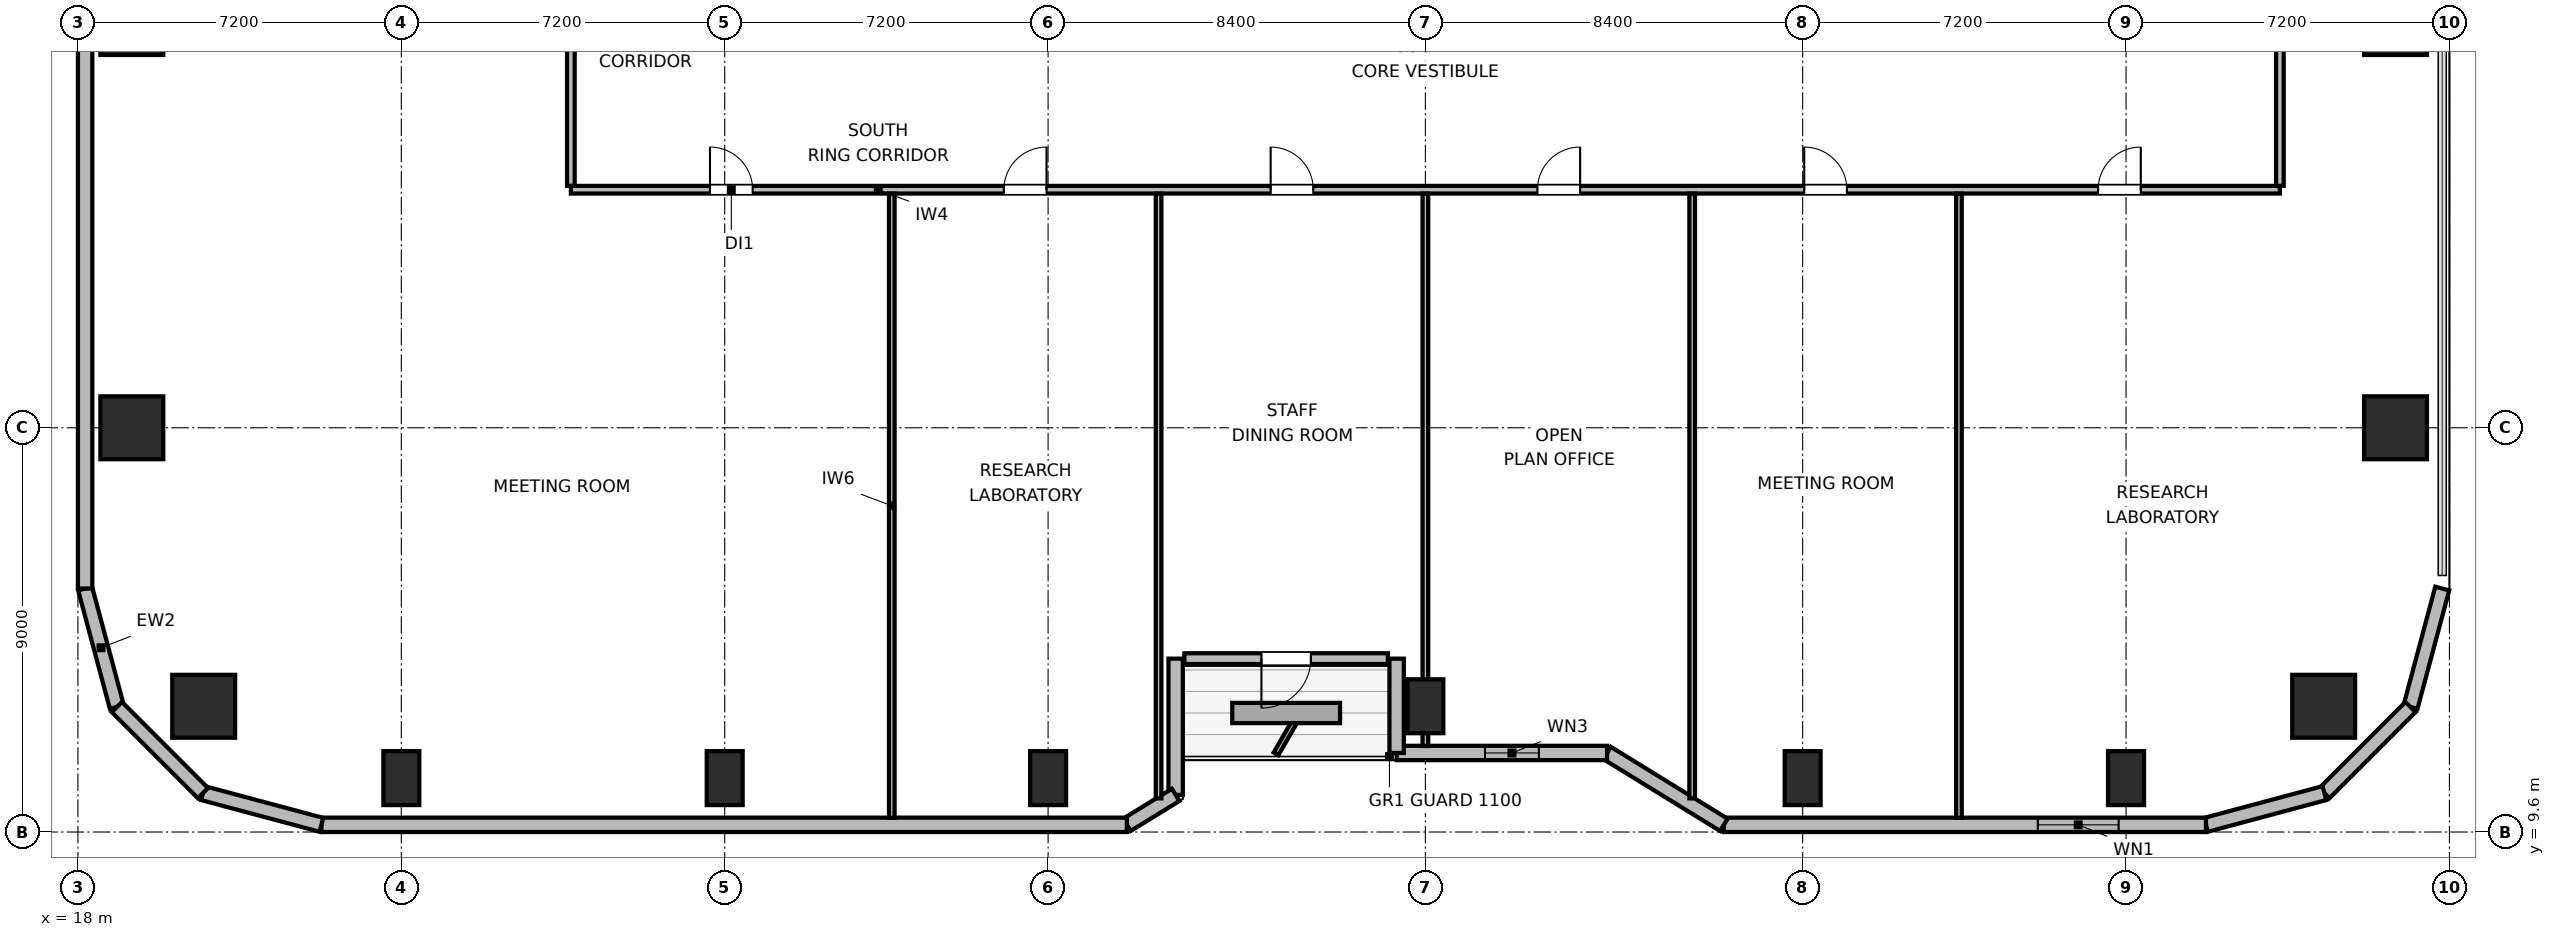
"""IFC4 building model, lengths in metres.
Left out: names, types, materials, properties, quantities, classifications, styles, units other than length and angle.
Written with IfcOpenShell. Run it as: python <this file> out.ifc"""

import sys

from ifc_helpers import new_model, si_unit, direction, frame, frame_2d, origin, origin_2d, place, context, subcontext, project, spatial, rectangle, circle, extrude, element, fill, save


model = new_model("IFC4")
c1 = context("Model", 3, precision=1e-05, world=origin(), true_north=direction((0.0, 1.0)))
c2 = subcontext(c1, "Body", "Model", "MODEL_VIEW")
j1 = project(units=[si_unit("LENGTHUNIT", "METRE"), si_unit("PLANEANGLEUNIT", "RADIAN")], contexts=[c1])
p1 = place(None, origin())
s1 = spatial("IfcSite", under=j1, at=p1, CompositionType="ELEMENT")
p2 = place(p1, origin())
s2 = spatial("IfcBuilding", under=s1, at=p2, CompositionType="ELEMENT")
p3 = place(p2, frame((0.0, 0.0, 101.4)))
s3 = spatial("IfcBuildingStorey", under=s2, at=p3, CompositionType="ELEMENT", Elevation=101.4)
for number, where, z_axis, x_axis in (
    (1, (20.8, 12.4, 0.0), (0.0, 0.0, 1.0), (1.0, 0.0, 0.0)),
    (2, (68.0, 12.4, 0.0), (0.0, 0.0, 1.0), (1.0, 0.0, 0.0)),
):
    element("IfcColumn", number, at=place(p3, frame(where, z_axis=z_axis, x_axis=x_axis)), inside=s3, PredefinedType="COLUMN", context=c2, shape_type="SweptSolid", body=[
        extrude(circle(Radius=0.7, at=origin_2d()), origin(), (0.0, 0.0, 1.0), 3.9),
    ])
for number, where, z_axis, x_axis in (
    (3, (25.2, 10.8, 0.0), (0.0, 0.0, 1.0), (1.0, 0.0, 0.0)),
    (4, (32.4, 10.8, 0.0), (0.0, 0.0, 1.0), (1.0, 0.0, 0.0)),
    (5, (39.6, 10.8, 0.0), (0.0, 0.0, 1.0), (1.0, 0.0, 0.0)),
    (6, (48.0, 12.4, 0.0), (0.0, 0.0, 1.0), (1.0, 0.0, 0.0)),
    (7, (56.4, 10.8, 0.0), (0.0, 0.0, 1.0), (1.0, 0.0, 0.0)),
    (8, (63.6, 10.8, 0.0), (0.0, 0.0, 1.0), (1.0, 0.0, 0.0)),
):
    element("IfcColumn", number, at=place(p3, frame(where, z_axis=z_axis, x_axis=x_axis)), inside=s3, PredefinedType="COLUMN", context=c2, shape_type="SweptSolid", body=[
        extrude(rectangle(XDim=0.8, YDim=1.2, at=origin_2d()), origin(), (0.0, 0.0, 1.0), 3.9),
    ])
for number, where, z_axis, x_axis in (
    (9, (19.2, 18.6, 0.0), (0.0, 0.0, 1.0), (1.0, 0.0, 0.0)),
    (10, (69.6, 18.6, 0.0), (0.0, 0.0, 1.0), (1.0, 0.0, 0.0)),
    (11, (19.2, 27.6, 0.0), (0.0, 0.0, 1.0), (1.0, 0.0, 0.0)),
    (12, (69.6, 27.6, 0.0), (0.0, 0.0, 1.0), (1.0, 0.0, 0.0)),
):
    element("IfcColumn", number, at=place(p3, frame(where, z_axis=z_axis, x_axis=x_axis)), inside=s3, PredefinedType="COLUMN", context=c2, shape_type="SweptSolid", body=[
        extrude(rectangle(XDim=1.4, YDim=1.4, at=origin_2d()), origin(), (0.0, 0.0, 1.0), 3.9),
    ])
p4 = place(p3, frame((18.866, 12.383, 0.0), z_axis=(0.0, 0.0, 1.0), x_axis=(-0.25869736047, 0.965958423373, 0.0)))
e13 = element("IfcWall", 13, at=p4, inside=s3, PredefinedType="SOLIDWALL", context=c2, shape_type="SweptSolid", body=[
    extrude(rectangle(XDim=2.731, YDim=0.32, at=frame_2d((1.366, 0.0))), origin(), (0.0, 0.0, 1.0), 3.64),
])
p5 = place(p3, frame((18.16, 15.021, 0.0), z_axis=(0.0, 0.0, 1.0), x_axis=(0.0, 1.0, 0.0)))
e14 = element("IfcWall", 14, at=p5, inside=s3, PredefinedType="SOLIDWALL", context=c2, shape_type="SweptSolid", body=[
    extrude(rectangle(XDim=14.219, YDim=0.32, at=frame_2d((7.109, 0.0))), origin(), (0.0, 0.0, 1.0), 3.64),
])
p6 = place(p3, frame((70.64, 15.021, 0.0), z_axis=(0.0, 0.0, 1.0), x_axis=(-0.258613949072, -0.965980758269, 0.0)))
e15 = element("IfcWall", 15, at=p6, inside=s3, PredefinedType="SOLIDWALL", context=c2, shape_type="SweptSolid", body=[
    extrude(rectangle(XDim=2.731, YDim=0.32, at=frame_2d((1.366, 0.0))), origin(), (0.0, 0.0, 1.0), 3.64),
])
p7 = place(p3, frame((69.934, 12.383, 0.0), z_axis=(0.0, 0.0, 1.0), x_axis=(-0.707151821269, -0.707061738235, 0.0)))
e16 = element("IfcWall", 16, at=p7, inside=s3, PredefinedType="SOLIDWALL", context=c2, shape_type="SweptSolid", body=[
    extrude(rectangle(XDim=2.71, YDim=0.32, at=frame_2d((1.355, 0.0))), origin(), (0.0, 0.0, 1.0), 3.64),
])
p8 = place(p3, frame((68.017, 10.467, 0.0), z_axis=(0.0, 0.0, 1.0), x_axis=(-0.965958423373, -0.25869736047, 0.0)))
e17 = element("IfcWall", 17, at=p8, inside=s3, PredefinedType="SOLIDWALL", context=c2, shape_type="SweptSolid", body=[
    extrude(rectangle(XDim=2.731, YDim=0.32, at=frame_2d((1.366, 0.0))), origin(), (0.0, 0.0, 1.0), 3.64),
])
p9 = place(p3, frame((65.379, 9.76, 0.0), z_axis=(0.0, 0.0, 1.0), x_axis=(-1.0, 0.0, 0.0)))
e18 = element("IfcWall", 18, at=p9, inside=s3, PredefinedType="SOLIDWALL", context=c2, shape_type="SweptSolid", body=[
    extrude(rectangle(XDim=10.734, YDim=0.32, at=frame_2d((5.367, 0.0))), origin(), (0.0, 0.0, 1.0), 3.64),
])
p10 = place(p9, frame((1.944, 0.0, 0.85)))
e19 = element("IfcOpeningElement", 19, at=p10, cuts=e18, PredefinedType="OPENING", context=c2, shape_type="SweptSolid", body=[
    extrude(rectangle(XDim=1.8, YDim=1.1, at=frame_2d((0.9, 0.55))), frame((0.0, 0.17, 0.0), z_axis=(0.0, -1.0, 0.0), x_axis=(1.0, 0.0, 0.0)), (0.0, 0.0, 1.0), 0.34),
])
p11 = place(p3, frame((54.645, 9.76, 0.0), z_axis=(0.0, 0.0, 1.0), x_axis=(-0.851630857047, 0.524142044989, 0.0)))
e20 = element("IfcWall", 20, at=p11, inside=s3, PredefinedType="SOLIDWALL", context=c2, shape_type="SweptSolid", body=[
    extrude(rectangle(XDim=3.053, YDim=0.32, at=frame_2d((1.526, 0.0))), origin(), (0.0, 0.0, 1.0), 2.875),
])
p12 = place(p3, frame((52.045, 11.36, 0.0), z_axis=(0.0, 0.0, 1.0), x_axis=(-1.0, 0.0, 0.0)))
e21 = element("IfcWall", 21, at=p12, inside=s3, PredefinedType="SOLIDWALL", context=c2, shape_type="SweptSolid", body=[
    extrude(rectangle(XDim=4.685, YDim=0.32, at=frame_2d((2.343, 0.0))), origin(), (0.0, 0.0, 1.0), 2.875),
])
p13 = place(p12, frame((1.518, 0.0, 0.85)))
e22 = element("IfcOpeningElement", 22, at=p13, cuts=e21, PredefinedType="OPENING", context=c2, shape_type="SweptSolid", body=[
    extrude(rectangle(XDim=1.2, YDim=1.1, at=frame_2d((0.6, 0.55))), frame((0.0, 0.17, 0.0), z_axis=(0.0, -1.0, 0.0), x_axis=(1.0, 0.0, 0.0)), (0.0, 0.0, 1.0), 0.34),
])
p14 = place(p3, frame((47.36, 11.36, 0.0), z_axis=(0.0, 0.0, 1.0), x_axis=(0.0, 1.0, 0.0)))
e23 = element("IfcWall", 23, at=p14, inside=s3, PredefinedType="SOLIDWALL", context=c2, shape_type="SweptSolid", body=[
    extrude(rectangle(XDim=2.1, YDim=0.32, at=frame_2d((1.05, 0.0))), origin(), (0.0, 0.0, 1.0), 2.875),
])
p15 = place(p3, frame((47.165, 13.46, 0.0), z_axis=(0.0, 0.0, 1.0), x_axis=(-1.0, 0.0, 0.0)))
e24 = element("IfcWall", 24, at=p15, inside=s3, PredefinedType="SOLIDWALL", context=c2, shape_type="SweptSolid", body=[
    extrude(rectangle(XDim=4.53, YDim=0.24, at=frame_2d((2.265, 0.0))), origin(), (0.0, 0.0, 1.0), 3.64),
])
p16 = place(p15, frame((1.715, 0.0, 0.0)))
e25 = element("IfcOpeningElement", 25, at=p16, cuts=e24, PredefinedType="OPENING", context=c2, shape_type="SweptSolid", body=[
    extrude(rectangle(XDim=1.1, YDim=2.04, at=frame_2d((0.55, 1.02))), frame((0.0, 0.13, 0.0), z_axis=(0.0, -1.0, 0.0), x_axis=(1.0, 0.0, 0.0)), (0.0, 0.0, 1.0), 0.26),
])
p17 = place(p3, frame((42.44, 13.46, 0.0), z_axis=(0.0, 0.0, 1.0), x_axis=(0.0, -1.0, 0.0)))
e26 = element("IfcWall", 26, at=p17, inside=s3, PredefinedType="SOLIDWALL", context=c2, shape_type="SweptSolid", body=[
    extrude(rectangle(XDim=3.032, YDim=0.32, at=frame_2d((1.516, 0.0))), origin(), (0.0, 0.0, 1.0), 2.875),
])
p18 = place(p3, frame((42.44, 10.427, 0.0), z_axis=(0.0, 0.0, 1.0), x_axis=(-0.851776724646, -0.523904964045, 0.0)))
e27 = element("IfcWall", 27, at=p18, inside=s3, PredefinedType="SOLIDWALL", context=c2, shape_type="SweptSolid", body=[
    extrude(rectangle(XDim=1.274, YDim=0.32, at=frame_2d((0.637, 0.0))), origin(), (0.0, 0.0, 1.0), 3.64),
])
p19 = place(p3, frame((41.355, 9.76, 0.0), z_axis=(0.0, 0.0, 1.0), x_axis=(-1.0, 0.0, 0.0)))
e28 = element("IfcWall", 28, at=p19, inside=s3, PredefinedType="SOLIDWALL", context=c2, shape_type="SweptSolid", body=[
    extrude(rectangle(XDim=17.934, YDim=0.32, at=frame_2d((8.967, 0.0))), origin(), (0.0, 0.0, 1.0), 3.64),
])
p20 = place(p3, frame((23.421, 9.76, 0.0), z_axis=(0.0, 0.0, 1.0), x_axis=(-0.965964405026, 0.25867502435, 0.0)))
e29 = element("IfcWall", 29, at=p20, inside=s3, PredefinedType="SOLIDWALL", context=c2, shape_type="SweptSolid", body=[
    extrude(rectangle(XDim=2.731, YDim=0.32, at=frame_2d((1.366, 0.0))), origin(), (0.0, 0.0, 1.0), 3.64),
])
p21 = place(p3, frame((20.783, 10.467, 0.0), z_axis=(0.0, 0.0, 1.0), x_axis=(-0.707106781187, 0.707106781187, 0.0)))
e30 = element("IfcWall", 30, at=p21, inside=s3, PredefinedType="SOLIDWALL", context=c2, shape_type="SweptSolid", body=[
    extrude(rectangle(XDim=2.71, YDim=0.32, at=frame_2d((1.355, 0.0))), origin(), (0.0, 0.0, 1.0), 3.64),
])
p22 = place(p3, frame((28.975, 23.9, 0.0), z_axis=(0.0, 0.0, 1.0), x_axis=(1.0, 0.0, 0.0)))
e31 = element("IfcWall", 31, at=p22, inside=s3, PredefinedType="PARTITIONING", context=c2, shape_type="SweptSolid", body=[
    extrude(rectangle(XDim=38.05, YDim=0.17, at=frame_2d((19.025, 0.0))), origin(), (0.0, 0.0, 1.0), 3.64),
])
p23 = place(p22, frame((3.097, 0.0, 0.0)))
e32 = element("IfcOpeningElement", 32, at=p23, cuts=e31, PredefinedType="OPENING", context=c2, shape_type="SweptSolid", body=[
    extrude(rectangle(XDim=0.95, YDim=2.04, at=frame_2d((0.475, 1.02))), frame((0.0, 0.095, 0.0), z_axis=(0.0, -1.0, 0.0), x_axis=(1.0, 0.0, 0.0)), (0.0, 0.0, 1.0), 0.19),
])
p24 = place(p22, frame((9.64, 0.0, 0.0)))
e33 = element("IfcOpeningElement", 33, at=p24, cuts=e31, PredefinedType="OPENING", context=c2, shape_type="SweptSolid", body=[
    extrude(rectangle(XDim=0.95, YDim=2.04, at=frame_2d((0.475, 1.02))), frame((0.0, 0.095, 0.0), z_axis=(0.0, -1.0, 0.0), x_axis=(1.0, 0.0, 0.0)), (0.0, 0.0, 1.0), 0.19),
])
p25 = place(p22, frame((15.58, 0.0, 0.0)))
e34 = element("IfcOpeningElement", 34, at=p25, cuts=e31, PredefinedType="OPENING", context=c2, shape_type="SweptSolid", body=[
    extrude(rectangle(XDim=0.95, YDim=2.04, at=frame_2d((0.475, 1.02))), frame((0.0, 0.095, 0.0), z_axis=(0.0, -1.0, 0.0), x_axis=(1.0, 0.0, 0.0)), (0.0, 0.0, 1.0), 0.19),
])
p26 = place(p22, frame((21.52, 0.0, 0.0)))
e35 = element("IfcOpeningElement", 35, at=p26, cuts=e31, PredefinedType="OPENING", context=c2, shape_type="SweptSolid", body=[
    extrude(rectangle(XDim=0.95, YDim=2.04, at=frame_2d((0.475, 1.02))), frame((0.0, 0.095, 0.0), z_axis=(0.0, -1.0, 0.0), x_axis=(1.0, 0.0, 0.0)), (0.0, 0.0, 1.0), 0.19),
])
p27 = place(p22, frame((27.46, 0.0, 0.0)))
e36 = element("IfcOpeningElement", 36, at=p27, cuts=e31, PredefinedType="OPENING", context=c2, shape_type="SweptSolid", body=[
    extrude(rectangle(XDim=0.95, YDim=2.04, at=frame_2d((0.475, 1.02))), frame((0.0, 0.095, 0.0), z_axis=(0.0, -1.0, 0.0), x_axis=(1.0, 0.0, 0.0)), (0.0, 0.0, 1.0), 0.19),
])
p28 = place(p22, frame((34.003, 0.0, 0.0)))
e37 = element("IfcOpeningElement", 37, at=p28, cuts=e31, PredefinedType="OPENING", context=c2, shape_type="SweptSolid", body=[
    extrude(rectangle(XDim=0.95, YDim=2.04, at=frame_2d((0.475, 1.02))), frame((0.0, 0.095, 0.0), z_axis=(0.0, -1.0, 0.0), x_axis=(1.0, 0.0, 0.0)), (0.0, 0.0, 1.0), 0.19),
])
p29 = place(p3, frame((28.975, 23.987, 0.0), z_axis=(0.0, 0.0, 1.0), x_axis=(0.0, 1.0, 0.0)))
e38 = element("IfcWall", 38, at=p29, inside=s3, PredefinedType="PARTITIONING", context=c2, shape_type="SweptSolid", body=[
    extrude(rectangle(XDim=24.026, YDim=0.17, at=frame_2d((12.013, 0.0))), origin(), (0.0, 0.0, 1.0), 3.64),
])
p30 = place(p29, frame((11.538, 0.0, 0.0)))
e39 = element("IfcOpeningElement", 39, at=p30, cuts=e38, PredefinedType="OPENING", context=c2, shape_type="SweptSolid", body=[
    extrude(rectangle(XDim=0.95, YDim=2.04, at=frame_2d((0.475, 1.02))), frame((0.0, 0.095, 0.0), z_axis=(0.0, -1.0, 0.0), x_axis=(1.0, 0.0, 0.0)), (0.0, 0.0, 1.0), 0.19),
])
p31 = place(p3, frame((67.025, 23.987, 0.0), z_axis=(0.0, 0.0, 1.0), x_axis=(0.0, 1.0, 0.0)))
e40 = element("IfcWall", 40, at=p31, inside=s3, PredefinedType="PARTITIONING", context=c2, shape_type="SweptSolid", body=[
    extrude(rectangle(XDim=24.026, YDim=0.17, at=frame_2d((12.013, 0.0))), origin(), (0.0, 0.0, 1.0), 3.64),
])
p32 = place(p31, frame((6.088, 0.0, 0.0)))
e41 = element("IfcOpeningElement", 41, at=p32, cuts=e40, PredefinedType="OPENING", context=c2, shape_type="SweptSolid", body=[
    extrude(rectangle(XDim=0.95, YDim=2.04, at=frame_2d((0.475, 1.02))), frame((0.0, 0.095, 0.0), z_axis=(0.0, -1.0, 0.0), x_axis=(1.0, 0.0, 0.0)), (0.0, 0.0, 1.0), 0.19),
])
p33 = place(p31, frame((18.188, 0.0, 0.0)))
e42 = element("IfcOpeningElement", 42, at=p33, cuts=e40, PredefinedType="OPENING", context=c2, shape_type="SweptSolid", body=[
    extrude(rectangle(XDim=0.95, YDim=2.04, at=frame_2d((0.475, 1.02))), frame((0.0, 0.095, 0.0), z_axis=(0.0, -1.0, 0.0), x_axis=(1.0, 0.0, 0.0)), (0.0, 0.0, 1.0), 0.19),
])
p34 = place(p3, frame((36.12, 9.915, 0.0), z_axis=(0.0, 0.0, 1.0), x_axis=(0.0, 1.0, 0.0)))
e43 = element("IfcWall", 43, at=p34, inside=s3, PredefinedType="PARTITIONING", context=c2, shape_type="SweptSolid", body=[
    extrude(rectangle(XDim=13.898, YDim=0.125, at=frame_2d((6.949, 0.0))), origin(), (0.0, 0.0, 1.0), 3.64),
])
p35 = place(p3, frame((42.06, 10.349, 0.0), z_axis=(0.0, 0.0, 1.0), x_axis=(0.0, 1.0, 0.0)))
e44 = element("IfcWall", 44, at=p35, inside=s3, PredefinedType="PARTITIONING", context=c2, shape_type="SweptSolid", body=[
    extrude(rectangle(XDim=13.464, YDim=0.125, at=frame_2d((6.732, 0.0))), origin(), (0.0, 0.0, 1.0), 3.003),
])
p36 = place(p3, frame((48.0, 11.515, 0.0), z_axis=(0.0, 0.0, 1.0), x_axis=(0.0, 1.0, 0.0)))
e45 = element("IfcWall", 45, at=p36, inside=s3, PredefinedType="PARTITIONING", context=c2, shape_type="SweptSolid", body=[
    extrude(rectangle(XDim=12.298, YDim=0.125, at=frame_2d((6.149, 0.0))), origin(), (0.0, 0.0, 1.0), 3.003),
])
p37 = place(p3, frame((53.94, 10.349, 0.0), z_axis=(0.0, 0.0, 1.0), x_axis=(0.0, 1.0, 0.0)))
e46 = element("IfcWall", 46, at=p37, inside=s3, PredefinedType="PARTITIONING", context=c2, shape_type="SweptSolid", body=[
    extrude(rectangle(XDim=13.464, YDim=0.125, at=frame_2d((6.732, 0.0))), origin(), (0.0, 0.0, 1.0), 3.003),
])
p38 = place(p3, frame((59.88, 9.915, 0.0), z_axis=(0.0, 0.0, 1.0), x_axis=(0.0, 1.0, 0.0)))
e47 = element("IfcWall", 47, at=p38, inside=s3, PredefinedType="PARTITIONING", context=c2, shape_type="SweptSolid", body=[
    extrude(rectangle(XDim=13.898, YDim=0.125, at=frame_2d((6.949, 0.0))), origin(), (0.0, 0.0, 1.0), 3.64),
])
p39 = place(p10, origin())
e48 = element("IfcWindow", 48, at=p39, inside=s3, PartitioningType="SINGLE_PANEL", PredefinedType="WINDOW", context=c2, shape_type="SweptSolid", body=[
    extrude(rectangle(XDim=1.8, YDim=1.1, at=frame_2d((0.9, 0.55))), frame((0.0, 0.03, 0.0), z_axis=(0.0, -1.0, 0.0), x_axis=(1.0, 0.0, 0.0)), (0.0, 0.0, 1.0), 0.06),
])
fill(e19, e48)
p40 = place(p13, origin())
e49 = element("IfcWindow", 49, at=p40, inside=s3, PartitioningType="SINGLE_PANEL", PredefinedType="WINDOW", context=c2, shape_type="SweptSolid", body=[
    extrude(rectangle(XDim=1.2, YDim=1.1, at=frame_2d((0.6, 0.55))), frame((0.0, 0.03, 0.0), z_axis=(0.0, -1.0, 0.0), x_axis=(1.0, 0.0, 0.0)), (0.0, 0.0, 1.0), 0.06),
])
fill(e22, e49)
p41 = place(p16, origin())
e50 = element("IfcDoor", 50, at=p41, inside=s3, OperationType="SINGLE_SWING_RIGHT", PredefinedType="DOOR", context=c2, shape_type="SweptSolid", body=[
    extrude(rectangle(XDim=1.1, YDim=2.04, at=frame_2d((0.55, 1.02))), frame((0.0, 0.025, 0.0), z_axis=(0.0, -1.0, 0.0), x_axis=(1.0, 0.0, 0.0)), (0.0, 0.0, 1.0), 0.05),
])
fill(e25, e50)
p42 = place(p23, origin())
e51 = element("IfcDoor", 51, at=p42, inside=s3, OperationType="SINGLE_SWING_LEFT", PredefinedType="DOOR", context=c2, shape_type="SweptSolid", body=[
    extrude(rectangle(XDim=0.95, YDim=2.04, at=frame_2d((0.475, 1.02))), frame((0.0, 0.025, 0.0), z_axis=(0.0, -1.0, 0.0), x_axis=(1.0, 0.0, 0.0)), (0.0, 0.0, 1.0), 0.05),
])
fill(e32, e51)
p43 = place(p24, origin())
e52 = element("IfcDoor", 52, at=p43, inside=s3, OperationType="SINGLE_SWING_RIGHT", PredefinedType="DOOR", context=c2, shape_type="SweptSolid", body=[
    extrude(rectangle(XDim=0.95, YDim=2.04, at=frame_2d((0.475, 1.02))), frame((0.0, 0.025, 0.0), z_axis=(0.0, -1.0, 0.0), x_axis=(1.0, 0.0, 0.0)), (0.0, 0.0, 1.0), 0.05),
])
fill(e33, e52)
p44 = place(p25, origin())
e53 = element("IfcDoor", 53, at=p44, inside=s3, OperationType="SINGLE_SWING_LEFT", PredefinedType="DOOR", context=c2, shape_type="SweptSolid", body=[
    extrude(rectangle(XDim=0.95, YDim=2.04, at=frame_2d((0.475, 1.02))), frame((0.0, 0.025, 0.0), z_axis=(0.0, -1.0, 0.0), x_axis=(1.0, 0.0, 0.0)), (0.0, 0.0, 1.0), 0.05),
])
fill(e34, e53)
p45 = place(p26, origin())
e54 = element("IfcDoor", 54, at=p45, inside=s3, OperationType="SINGLE_SWING_RIGHT", PredefinedType="DOOR", context=c2, shape_type="SweptSolid", body=[
    extrude(rectangle(XDim=0.95, YDim=2.04, at=frame_2d((0.475, 1.02))), frame((0.0, 0.025, 0.0), z_axis=(0.0, -1.0, 0.0), x_axis=(1.0, 0.0, 0.0)), (0.0, 0.0, 1.0), 0.05),
])
fill(e35, e54)
p46 = place(p27, origin())
e55 = element("IfcDoor", 55, at=p46, inside=s3, OperationType="SINGLE_SWING_LEFT", PredefinedType="DOOR", context=c2, shape_type="SweptSolid", body=[
    extrude(rectangle(XDim=0.95, YDim=2.04, at=frame_2d((0.475, 1.02))), frame((0.0, 0.025, 0.0), z_axis=(0.0, -1.0, 0.0), x_axis=(1.0, 0.0, 0.0)), (0.0, 0.0, 1.0), 0.05),
])
fill(e36, e55)
p47 = place(p28, origin())
e56 = element("IfcDoor", 56, at=p47, inside=s3, OperationType="SINGLE_SWING_RIGHT", PredefinedType="DOOR", context=c2, shape_type="SweptSolid", body=[
    extrude(rectangle(XDim=0.95, YDim=2.04, at=frame_2d((0.475, 1.02))), frame((0.0, 0.025, 0.0), z_axis=(0.0, -1.0, 0.0), x_axis=(1.0, 0.0, 0.0)), (0.0, 0.0, 1.0), 0.05),
])
fill(e37, e56)
save(model, sys.argv[1])
